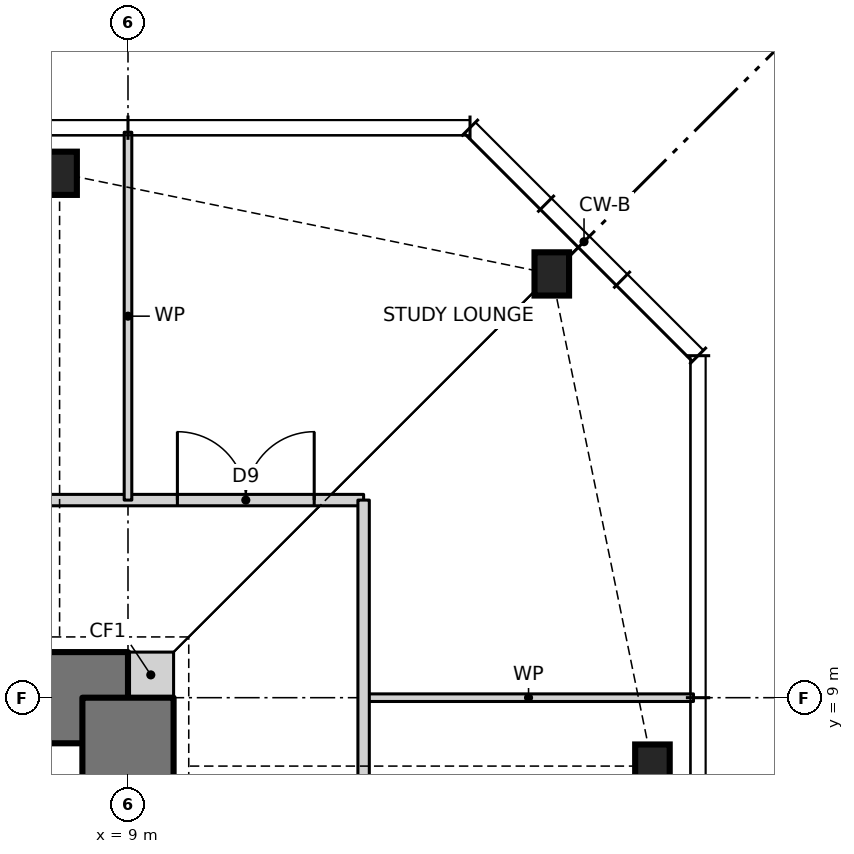
"""IFC4 building model, lengths in metres.
Left out: names, types, materials, properties, quantities, classifications, styles, units other than length and angle.
Written with IfcOpenShell. Run it as: python <this file> out.ifc"""

import sys

from ifc_helpers import new_model, si_unit, direction, frame, frame_2d, origin, origin_2d, place, context, subcontext, project, spatial, rectangle, i_section, extrude, element, fill, save


model = new_model("IFC4")
c1 = context("Model", 3, precision=1e-05, world=origin(), true_north=direction((0.0, 1.0)))
c2 = subcontext(c1, "Body", "Model", "MODEL_VIEW")
j1 = project(units=[si_unit("LENGTHUNIT", "METRE"), si_unit("PLANEANGLEUNIT", "RADIAN")], contexts=[c1])
p1 = place(None, origin())
s1 = spatial("IfcSite", under=j1, at=p1, CompositionType="ELEMENT")
p2 = place(p1, origin())
s2 = spatial("IfcBuilding", under=s1, at=p2, CompositionType="ELEMENT")
p3 = place(p2, frame((0.0, 0.0, 250.0)))
s3 = spatial("IfcBuildingStorey", under=s2, at=p3, CompositionType="ELEMENT", Elevation=250.0)
for number, where, z_axis, x_axis in (
    (1, (15.9, 8.1, 0.0), (0.0, 0.0, 1.0), (1.0, 0.0, 0.0)),
    (2, (14.576, 14.576, 0.0), (0.0, 0.0, 1.0), (1.0, 0.0, 0.0)),
    (3, (8.1, 15.9, 0.0), (0.0, 0.0, 1.0), (1.0, 0.0, 0.0)),
):
    element("IfcColumn", number, at=place(p3, frame(where, z_axis=z_axis, x_axis=x_axis)), inside=s3, PredefinedType="COLUMN", context=c2, shape_type="SweptSolid", body=[
        extrude(i_section(OverallWidth=0.455, OverallDepth=0.569, WebThickness=0.078, FlangeThickness=0.125, at=origin_2d()), origin(), (0.0, 0.0, 1.0), 3.5),
    ])
p4 = place(p3, frame((9.0, 9.3, 0.0), z_axis=(0.0, 0.0, 1.0), x_axis=(1.0, 0.0, 0.0)))
e4 = element("IfcWall", 4, at=p4, inside=s3, PredefinedType="SOLIDWALL", context=c2, shape_type="SweptSolid", body=[
    extrude(rectangle(XDim=0.6, YDim=0.6, at=frame_2d((0.3, 0.0))), origin(), (0.0, 0.0, 1.0), 3.5),
])
p5 = place(p3, frame((9.0, 9.0, 0.0), z_axis=(0.0, 0.0, 1.0), x_axis=(-1.0, 0.0, 0.0)))
e5 = element("IfcWall", 5, at=p5, inside=s3, PredefinedType="SHEAR", context=c2, shape_type="SweptSolid", body=[
    extrude(rectangle(XDim=18.0, YDim=1.2, at=frame_2d((9.0, 0.0))), origin(), (0.0, 0.0, 1.0), 3.5),
])
p6 = place(p5, frame((11.125, 0.0, 0.0)))
e6 = element("IfcOpeningElement", 6, at=p6, cuts=e5, PredefinedType="OPENING", context=c2, shape_type="SweptSolid", body=[
    extrude(rectangle(XDim=0.9, YDim=2.1, at=frame_2d((0.45, 1.05))), frame((0.0, 0.61, 0.0), z_axis=(0.0, -1.0, 0.0), x_axis=(1.0, 0.0, 0.0)), (0.0, 0.0, 1.0), 1.22),
])
p7 = place(p5, frame((4.275, 0.0, 0.0)))
e7 = element("IfcOpeningElement", 7, at=p7, cuts=e5, PredefinedType="OPENING", context=c2, shape_type="SweptSolid", body=[
    extrude(rectangle(XDim=0.9, YDim=2.1, at=frame_2d((0.45, 1.05))), frame((0.0, 0.61, 0.0), z_axis=(0.0, -1.0, 0.0), x_axis=(1.0, 0.0, 0.0)), (0.0, 0.0, 1.0), 1.22),
])
p8 = place(p3, frame((9.0, -9.0, 0.0), z_axis=(0.0, 0.0, 1.0), x_axis=(0.0, 1.0, 0.0)))
e8 = element("IfcWall", 8, at=p8, inside=s3, PredefinedType="SHEAR", context=c2, shape_type="SweptSolid", body=[
    extrude(rectangle(XDim=18.0, YDim=1.2, at=frame_2d((9.0, 0.0))), origin(), (0.0, 0.0, 1.0), 3.5),
])
p9 = place(p8, frame((8.5, 0.0, 0.0)))
e9 = element("IfcOpeningElement", 9, at=p9, cuts=e8, PredefinedType="OPENING", context=c2, shape_type="SweptSolid", body=[
    extrude(rectangle(XDim=1.0, YDim=2.1, at=frame_2d((0.5, 1.05))), frame((0.0, 0.61, 0.0), z_axis=(0.0, -1.0, 0.0), x_axis=(1.0, 0.0, 0.0)), (0.0, 0.0, 1.0), 1.22),
])
p10 = place(p3, frame((12.1, 9.0, 0.0), z_axis=(0.0, 0.0, 1.0), x_axis=(1.0, 0.0, 0.0)))
e10 = element("IfcWall", 10, at=p10, inside=s3, PredefinedType="PARTITIONING", context=c2, shape_type="SweptSolid", body=[
    extrude(rectangle(XDim=4.34, YDim=0.1, at=frame_2d((2.17, 0.0))), origin(), (0.0, 0.0, 1.0), 3.27),
])
p11 = place(p3, frame((-11.6, 11.6, 0.0), z_axis=(0.0, 0.0, 1.0), x_axis=(1.0, 0.0, 0.0)))
e11 = element("IfcWall", 11, at=p11, inside=s3, PredefinedType="PARTITIONING", context=c2, shape_type="SweptSolid", body=[
    extrude(rectangle(XDim=23.7, YDim=0.15, at=frame_2d((11.85, 0.0))), origin(), (0.0, 0.0, 1.0), 3.27),
])
p12 = place(p11, frame((17.85, 0.0, 0.0)))
e12 = element("IfcOpeningElement", 12, at=p12, cuts=e11, PredefinedType="OPENING", context=c2, shape_type="SweptSolid", body=[
    extrude(rectangle(XDim=1.0, YDim=2.1, at=frame_2d((0.5, 1.05))), frame((0.0, 0.085, 0.0), z_axis=(0.0, -1.0, 0.0), x_axis=(1.0, 0.0, 0.0)), (0.0, 0.0, 1.0), 0.17),
])
p13 = place(p11, frame((4.35, 0.0, 0.0)))
e13 = element("IfcOpeningElement", 13, at=p13, cuts=e11, PredefinedType="OPENING", context=c2, shape_type="SweptSolid", body=[
    extrude(rectangle(XDim=1.0, YDim=2.1, at=frame_2d((0.5, 1.05))), frame((0.0, 0.085, 0.0), z_axis=(0.0, -1.0, 0.0), x_axis=(1.0, 0.0, 0.0)), (0.0, 0.0, 1.0), 0.17),
])
p14 = place(p11, frame((0.4, 0.0, 0.0)))
e14 = element("IfcOpeningElement", 14, at=p14, cuts=e11, PredefinedType="OPENING", context=c2, shape_type="SweptSolid", body=[
    extrude(rectangle(XDim=1.8, YDim=2.1, at=frame_2d((0.9, 1.05))), frame((0.0, 0.085, 0.0), z_axis=(0.0, -1.0, 0.0), x_axis=(1.0, 0.0, 0.0)), (0.0, 0.0, 1.0), 0.17),
])
p15 = place(p11, frame((21.25, 0.0, 0.0)))
e15 = element("IfcOpeningElement", 15, at=p15, cuts=e11, PredefinedType="OPENING", context=c2, shape_type="SweptSolid", body=[
    extrude(rectangle(XDim=1.8, YDim=2.1, at=frame_2d((0.9, 1.05))), frame((0.0, 0.085, 0.0), z_axis=(0.0, -1.0, 0.0), x_axis=(1.0, 0.0, 0.0)), (0.0, 0.0, 1.0), 0.17),
])
p16 = place(p3, frame((12.1, -11.6, 0.0), z_axis=(0.0, 0.0, 1.0), x_axis=(0.0, 1.0, 0.0)))
e16 = element("IfcWall", 16, at=p16, inside=s3, PredefinedType="PARTITIONING", context=c2, shape_type="SweptSolid", body=[
    extrude(rectangle(XDim=23.2, YDim=0.15, at=frame_2d((11.6, 0.0))), origin(), (0.0, 0.0, 1.0), 3.27),
])
p17 = place(p16, frame((5.7, 0.0, 0.0)))
e17 = element("IfcOpeningElement", 17, at=p17, cuts=e16, PredefinedType="OPENING", context=c2, shape_type="SweptSolid", body=[
    extrude(rectangle(XDim=1.0, YDim=2.1, at=frame_2d((0.5, 1.05))), frame((0.0, 0.085, 0.0), z_axis=(0.0, -1.0, 0.0), x_axis=(1.0, 0.0, 0.0)), (0.0, 0.0, 1.0), 0.17),
])
p18 = place(p16, frame((17.85, 0.0, 0.0)))
e18 = element("IfcOpeningElement", 18, at=p18, cuts=e16, PredefinedType="OPENING", context=c2, shape_type="SweptSolid", body=[
    extrude(rectangle(XDim=1.0, YDim=2.1, at=frame_2d((0.5, 1.05))), frame((0.0, 0.085, 0.0), z_axis=(0.0, -1.0, 0.0), x_axis=(1.0, 0.0, 0.0)), (0.0, 0.0, 1.0), 0.17),
])
p19 = place(p3, frame((9.0, 11.6, 0.0), z_axis=(0.0, 0.0, 1.0), x_axis=(0.0, 1.0, 0.0)))
e19 = element("IfcWall", 19, at=p19, inside=s3, PredefinedType="PARTITIONING", context=c2, shape_type="SweptSolid", body=[
    extrude(rectangle(XDim=4.84, YDim=0.1, at=frame_2d((2.42, 0.0))), origin(), (0.0, 0.0, 1.0), 3.27),
])
p20 = place(p15, origin())
e20 = element("IfcDoor", 20, at=p20, inside=s3, OperationType="DOUBLE_DOOR_SINGLE_SWING", PredefinedType="DOOR", context=c2, shape_type="SweptSolid", body=[
    extrude(rectangle(XDim=1.8, YDim=2.1, at=frame_2d((0.9, 1.05))), frame((0.0, 0.025, 0.0), z_axis=(0.0, -1.0, 0.0), x_axis=(1.0, 0.0, 0.0)), (0.0, 0.0, 1.0), 0.05),
])
fill(e15, e20)
save(model, sys.argv[1])
